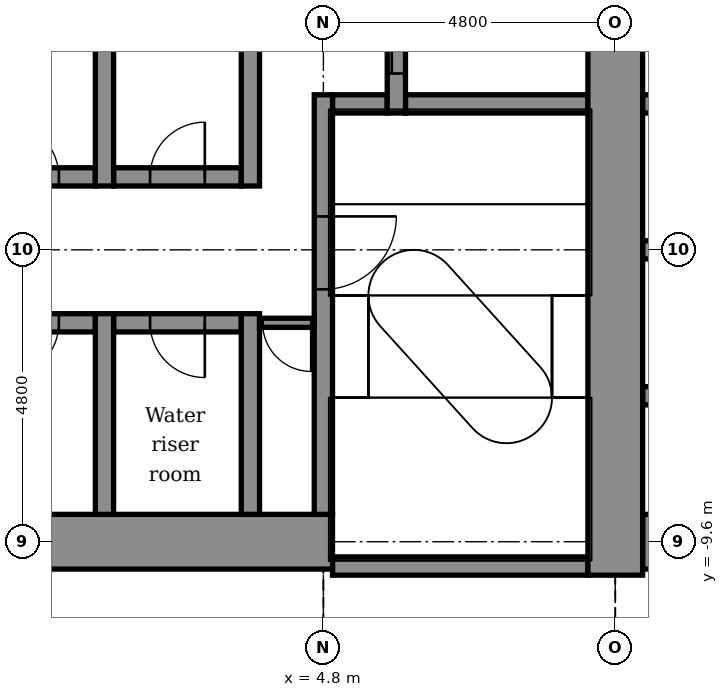
"""IFC4 building model, lengths in metres.
Left out: names, types, materials, properties, quantities, classifications, styles, units other than length and angle.
Written with IfcOpenShell. Run it as: python <this file> out.ifc"""

import sys

from ifc_helpers import new_model, si_unit, direction, frame, frame_2d, origin, place, context, subcontext, project, spatial, rectangle, extrude, element, fill, save


model = new_model("IFC4")
c1 = context("Model", 3, precision=1e-05, world=origin(), true_north=direction((0.0, 1.0)))
c2 = subcontext(c1, "Body", "Model", "MODEL_VIEW")
j1 = project(units=[si_unit("LENGTHUNIT", "METRE"), si_unit("PLANEANGLEUNIT", "RADIAN")], contexts=[c1])
p1 = place(None, origin())
s1 = spatial("IfcSite", under=j1, at=p1, CompositionType="ELEMENT")
p2 = place(p1, origin())
s2 = spatial("IfcBuilding", under=s1, at=p2, CompositionType="ELEMENT")
p3 = place(p2, frame((0.0, 0.0, 113.9)))
s3 = spatial("IfcBuildingStorey", under=s2, at=p3, CompositionType="ELEMENT", Elevation=113.9)
p4 = place(p3, frame((4.95, -10.0, -0.2), z_axis=(0.0, 0.0, 1.0), x_axis=(1.0, 0.0, 0.0)))
e1 = element("IfcWall", 1, at=p4, inside=s3, PredefinedType="STANDARD", context=c2, shape_type="SweptSolid", body=[
    extrude(rectangle(XDim=4.2, YDim=0.3, at=frame_2d((2.1, 0.0))), origin(), (0.0, 0.0, 1.0), 4.5),
])
p5 = place(p3, frame((-5.25, -9.6, -0.2), z_axis=(0.0, 0.0, 1.0), x_axis=(1.0, 0.0, 0.0)))
e2 = element("IfcWall", 2, at=p5, inside=s3, PredefinedType="SHEAR", context=c2, shape_type="SweptSolid", body=[
    extrude(rectangle(XDim=10.2, YDim=0.9, at=frame_2d((5.1, 0.0))), origin(), (0.0, 0.0, 1.0), 4.5),
])
p6 = place(p5, frame((0.6, 0.0, 0.2)))
e3 = element("IfcOpeningElement", 3, at=p6, cuts=e2, PredefinedType="OPENING", context=c2, shape_type="SweptSolid", body=[
    extrude(rectangle(XDim=0.9, YDim=2.1, at=frame_2d((0.45, 1.05))), frame((0.0, 0.46, 0.0), z_axis=(0.0, -1.0, 0.0), x_axis=(1.0, 0.0, 0.0)), (0.0, 0.0, 1.0), 0.92),
])
p7 = place(p3, frame((10.05, -9.6, -0.2), z_axis=(0.0, 0.0, 1.0), x_axis=(1.0, 0.0, 0.0)))
e4 = element("IfcWall", 4, at=p7, inside=s3, PredefinedType="SHEAR", context=c2, shape_type="SweptSolid", body=[
    extrude(rectangle(XDim=3.9, YDim=0.9, at=frame_2d((1.95, 0.0))), origin(), (0.0, 0.0, 1.0), 4.5),
])
p8 = place(p7, frame((0.5, 0.0, 0.2)))
e5 = element("IfcOpeningElement", 5, at=p8, cuts=e4, PredefinedType="OPENING", context=c2, shape_type="SweptSolid", body=[
    extrude(rectangle(XDim=0.9, YDim=2.1, at=frame_2d((0.45, 1.05))), frame((0.0, 0.46, 0.0), z_axis=(0.0, -1.0, 0.0), x_axis=(1.0, 0.0, 0.0)), (0.0, 0.0, 1.0), 0.92),
])
p9 = place(p7, frame((2.9, 0.0, 0.2)))
e6 = element("IfcOpeningElement", 6, at=p9, cuts=e4, PredefinedType="OPENING", context=c2, shape_type="SweptSolid", body=[
    extrude(rectangle(XDim=0.9, YDim=2.1, at=frame_2d((0.45, 1.05))), frame((0.0, 0.46, 0.0), z_axis=(0.0, -1.0, 0.0), x_axis=(1.0, 0.0, 0.0)), (0.0, 0.0, 1.0), 0.92),
])
p10 = place(p3, frame((10.05, -7.2, -0.2), z_axis=(0.0, 0.0, 1.0), x_axis=(1.0, 0.0, 0.0)))
e7 = element("IfcWall", 7, at=p10, inside=s3, PredefinedType="STANDARD", context=c2, shape_type="SweptSolid", body=[
    extrude(rectangle(XDim=3.9, YDim=0.3, at=frame_2d((1.95, 0.0))), origin(), (0.0, 0.0, 1.0), 4.5),
])
p11 = place(p3, frame((-1.05, -6.0, -0.2), z_axis=(0.0, 0.0, 1.0), x_axis=(1.0, 0.0, 0.0)))
e8 = element("IfcWall", 8, at=p11, inside=s3, PredefinedType="STANDARD", context=c2, shape_type="SweptSolid", body=[
    extrude(rectangle(XDim=2.1, YDim=0.3, at=frame_2d((1.05, 0.0))), origin(), (0.0, 0.0, 1.0), 4.5),
])
p12 = place(p11, frame((0.6, 0.0, 0.2)))
e9 = element("IfcOpeningElement", 9, at=p12, cuts=e8, PredefinedType="OPENING", context=c2, shape_type="SweptSolid", body=[
    extrude(rectangle(XDim=0.9, YDim=2.1, at=frame_2d((0.45, 1.05))), frame((0.0, 0.16, 0.0), z_axis=(0.0, -1.0, 0.0), x_axis=(1.0, 0.0, 0.0)), (0.0, 0.0, 1.0), 0.32),
])
p13 = place(p3, frame((1.35, -6.0, -0.2), z_axis=(0.0, 0.0, 1.0), x_axis=(1.0, 0.0, 0.0)))
e10 = element("IfcWall", 10, at=p13, inside=s3, PredefinedType="STANDARD", context=c2, shape_type="SweptSolid", body=[
    extrude(rectangle(XDim=2.1, YDim=0.3, at=frame_2d((1.05, 0.0))), origin(), (0.0, 0.0, 1.0), 4.5),
])
p14 = place(p13, frame((0.6, 0.0, 0.2)))
e11 = element("IfcOpeningElement", 11, at=p14, cuts=e10, PredefinedType="OPENING", context=c2, shape_type="SweptSolid", body=[
    extrude(rectangle(XDim=0.9, YDim=2.1, at=frame_2d((0.45, 1.05))), frame((0.0, 0.16, 0.0), z_axis=(0.0, -1.0, 0.0), x_axis=(1.0, 0.0, 0.0)), (0.0, 0.0, 1.0), 0.32),
])
p15 = place(p3, frame((10.05, -4.8, -0.2), z_axis=(0.0, 0.0, 1.0), x_axis=(1.0, 0.0, 0.0)))
e12 = element("IfcWall", 12, at=p15, inside=s3, PredefinedType="STANDARD", context=c2, shape_type="SweptSolid", body=[
    extrude(rectangle(XDim=3.9, YDim=0.3, at=frame_2d((1.95, 0.0))), origin(), (0.0, 0.0, 1.0), 4.5),
])
p16 = place(p3, frame((-1.05, -3.6, -0.2), z_axis=(0.0, 0.0, 1.0), x_axis=(1.0, 0.0, 0.0)))
e13 = element("IfcWall", 13, at=p16, inside=s3, PredefinedType="STANDARD", context=c2, shape_type="SweptSolid", body=[
    extrude(rectangle(XDim=2.1, YDim=0.3, at=frame_2d((1.05, 0.0))), origin(), (0.0, 0.0, 1.0), 4.5),
])
p17 = place(p16, frame((0.6, 0.0, 0.2)))
e14 = element("IfcOpeningElement", 14, at=p17, cuts=e13, PredefinedType="OPENING", context=c2, shape_type="SweptSolid", body=[
    extrude(rectangle(XDim=0.9, YDim=2.1, at=frame_2d((0.45, 1.05))), frame((0.0, 0.16, 0.0), z_axis=(0.0, -1.0, 0.0), x_axis=(1.0, 0.0, 0.0)), (0.0, 0.0, 1.0), 0.32),
])
p18 = place(p3, frame((1.35, -3.6, -0.2), z_axis=(0.0, 0.0, 1.0), x_axis=(1.0, 0.0, 0.0)))
e15 = element("IfcWall", 15, at=p18, inside=s3, PredefinedType="STANDARD", context=c2, shape_type="SweptSolid", body=[
    extrude(rectangle(XDim=2.1, YDim=0.3, at=frame_2d((1.05, 0.0))), origin(), (0.0, 0.0, 1.0), 4.5),
])
p19 = place(p18, frame((0.6, 0.0, 0.2)))
e16 = element("IfcOpeningElement", 16, at=p19, cuts=e15, PredefinedType="OPENING", context=c2, shape_type="SweptSolid", body=[
    extrude(rectangle(XDim=0.9, YDim=2.1, at=frame_2d((0.45, 1.05))), frame((0.0, 0.16, 0.0), z_axis=(0.0, -1.0, 0.0), x_axis=(1.0, 0.0, 0.0)), (0.0, 0.0, 1.0), 0.32),
])
p20 = place(p3, frame((4.95, -2.4, -0.2), z_axis=(0.0, 0.0, 1.0), x_axis=(1.0, 0.0, 0.0)))
e17 = element("IfcWall", 17, at=p20, inside=s3, PredefinedType="STANDARD", context=c2, shape_type="SweptSolid", body=[
    extrude(rectangle(XDim=0.9, YDim=0.3, at=frame_2d((0.45, 0.0))), origin(), (0.0, 0.0, 1.0), 4.5),
])
p21 = place(p3, frame((6.15, -2.4, -0.2), z_axis=(0.0, 0.0, 1.0), x_axis=(1.0, 0.0, 0.0)))
e18 = element("IfcWall", 18, at=p21, inside=s3, PredefinedType="STANDARD", context=c2, shape_type="SweptSolid", body=[
    extrude(rectangle(XDim=3.0, YDim=0.3, at=frame_2d((1.5, 0.0))), origin(), (0.0, 0.0, 1.0), 4.5),
])
p22 = place(p3, frame((10.05, -2.4, -0.2), z_axis=(0.0, 0.0, 1.0), x_axis=(1.0, 0.0, 0.0)))
e19 = element("IfcWall", 19, at=p22, inside=s3, PredefinedType="STANDARD", context=c2, shape_type="SweptSolid", body=[
    extrude(rectangle(XDim=3.9, YDim=0.3, at=frame_2d((1.95, 0.0))), origin(), (0.0, 0.0, 1.0), 4.5),
])
p23 = place(p3, frame((1.2, -9.15, -0.2), z_axis=(0.0, 0.0, 1.0), x_axis=(0.0, 1.0, 0.0)))
e20 = element("IfcWall", 20, at=p23, inside=s3, PredefinedType="STANDARD", context=c2, shape_type="SweptSolid", body=[
    extrude(rectangle(XDim=3.3, YDim=0.3, at=frame_2d((1.65, 0.0))), origin(), (0.0, 0.0, 1.0), 4.5),
])
p24 = place(p3, frame((1.2, -3.75, -0.2), z_axis=(0.0, 0.0, 1.0), x_axis=(0.0, 1.0, 0.0)))
e21 = element("IfcWall", 21, at=p24, inside=s3, PredefinedType="STANDARD", context=c2, shape_type="SweptSolid", body=[
    extrude(rectangle(XDim=7.5, YDim=0.3, at=frame_2d((3.75, 0.0))), origin(), (0.0, 0.0, 1.0), 4.5),
])
p25 = place(p3, frame((3.6, -9.15, -0.2), z_axis=(0.0, 0.0, 1.0), x_axis=(0.0, 1.0, 0.0)))
e22 = element("IfcWall", 22, at=p25, inside=s3, PredefinedType="STANDARD", context=c2, shape_type="SweptSolid", body=[
    extrude(rectangle(XDim=3.3, YDim=0.3, at=frame_2d((1.65, 0.0))), origin(), (0.0, 0.0, 1.0), 4.5),
])
p26 = place(p3, frame((3.6, -3.75, -0.2), z_axis=(0.0, 0.0, 1.0), x_axis=(0.0, 1.0, 0.0)))
e23 = element("IfcWall", 23, at=p26, inside=s3, PredefinedType="STANDARD", context=c2, shape_type="SweptSolid", body=[
    extrude(rectangle(XDim=7.5, YDim=0.3, at=frame_2d((3.75, 0.0))), origin(), (0.0, 0.0, 1.0), 4.5),
])
p27 = place(p3, frame((4.8, -9.15, -0.2), z_axis=(0.0, 0.0, 1.0), x_axis=(0.0, 1.0, 0.0)))
e24 = element("IfcWall", 24, at=p27, inside=s3, PredefinedType="STANDARD", context=c2, shape_type="SweptSolid", body=[
    extrude(rectangle(XDim=6.9, YDim=0.3, at=frame_2d((3.45, 0.0))), origin(), (0.0, 0.0, 1.0), 4.5),
])
p28 = place(p27, frame((3.7, 0.0, 0.2)))
e25 = element("IfcOpeningElement", 25, at=p28, cuts=e24, PredefinedType="OPENING", context=c2, shape_type="SweptSolid", body=[
    extrude(rectangle(XDim=1.2, YDim=2.1, at=frame_2d((0.6, 1.05))), frame((0.0, 0.16, 0.0), z_axis=(0.0, -1.0, 0.0), x_axis=(1.0, 0.0, 0.0)), (0.0, 0.0, 1.0), 0.32),
])
p29 = place(p3, frame((6.0, -2.55, -0.2), z_axis=(0.0, 0.0, 1.0), x_axis=(0.0, 1.0, 0.0)))
e26 = element("IfcWall", 26, at=p29, inside=s3, PredefinedType="STANDARD", context=c2, shape_type="SweptSolid", body=[
    extrude(rectangle(XDim=7.5, YDim=0.3, at=frame_2d((3.75, 0.0))), origin(), (0.0, 0.0, 1.0), 4.5),
])
p30 = place(p29, frame((0.65, 0.0, 0.2)))
e27 = element("IfcOpeningElement", 27, at=p30, cuts=e26, PredefinedType="OPENING", context=c2, shape_type="SweptSolid", body=[
    extrude(rectangle(XDim=1.4, YDim=2.1, at=frame_2d((0.7, 1.05))), frame((0.0, 0.16, 0.0), z_axis=(0.0, -1.0, 0.0), x_axis=(1.0, 0.0, 0.0)), (0.0, 0.0, 1.0), 0.32),
])
p31 = place(p29, frame((3.05, 0.0, 0.2)))
e28 = element("IfcOpeningElement", 28, at=p31, cuts=e26, PredefinedType="OPENING", context=c2, shape_type="SweptSolid", body=[
    extrude(rectangle(XDim=1.4, YDim=2.1, at=frame_2d((0.7, 1.05))), frame((0.0, 0.16, 0.0), z_axis=(0.0, -1.0, 0.0), x_axis=(1.0, 0.0, 0.0)), (0.0, 0.0, 1.0), 0.32),
])
p32 = place(p29, frame((5.45, 0.0, 0.2)))
e29 = element("IfcOpeningElement", 29, at=p32, cuts=e26, PredefinedType="OPENING", context=c2, shape_type="SweptSolid", body=[
    extrude(rectangle(XDim=1.4, YDim=2.1, at=frame_2d((0.7, 1.05))), frame((0.0, 0.16, 0.0), z_axis=(0.0, -1.0, 0.0), x_axis=(1.0, 0.0, 0.0)), (0.0, 0.0, 1.0), 0.32),
])
p33 = place(p3, frame((9.6, -10.15, -0.2), z_axis=(0.0, 0.0, 1.0), x_axis=(0.0, 1.0, 0.0)))
e30 = element("IfcWall", 30, at=p33, inside=s3, PredefinedType="SHEAR", context=c2, shape_type="SweptSolid", body=[
    extrude(rectangle(XDim=20.2, YDim=0.9, at=frame_2d((10.1, 0.0))), origin(), (0.0, 0.0, 1.0), 4.5),
])
p34 = place(p3, frame((3.75, -6.0, 0.0), z_axis=(0.0, 0.0, 1.0), x_axis=(1.0, 0.0, 0.0)))
e31 = element("IfcWall", 31, at=p34, inside=s3, PredefinedType="PARTITIONING", context=c2, shape_type="SweptSolid", body=[
    extrude(rectangle(XDim=0.9, YDim=0.15, at=frame_2d((0.45, 0.0))), origin(), (0.0, 0.0, 1.0), 4.3),
])
p35 = place(p34, frame((0.05, 0.0, 0.0)))
e32 = element("IfcOpeningElement", 32, at=p35, cuts=e31, PredefinedType="OPENING", context=c2, shape_type="SweptSolid", body=[
    extrude(rectangle(XDim=0.8, YDim=2.1, at=frame_2d((0.4, 1.05))), frame((0.0, 0.085, 0.0), z_axis=(0.0, -1.0, 0.0), x_axis=(1.0, 0.0, 0.0)), (0.0, 0.0, 1.0), 0.17),
])
p36 = place(p35, frame((0.8, 0.0, 0.0), z_axis=(0.0, 0.0, 1.0), x_axis=(-1.0, 0.0, 0.0)))
e33 = element("IfcDoor", 33, at=p36, inside=s3, OperationType="SINGLE_SWING_RIGHT", PredefinedType="DOOR", context=c2, shape_type="SweptSolid", body=[
    extrude(rectangle(XDim=0.8, YDim=2.1, at=frame_2d((0.4, 1.05))), frame((0.0, 0.025, 0.0), z_axis=(0.0, -1.0, 0.0), x_axis=(1.0, 0.0, 0.0)), (0.0, 0.0, 1.0), 0.05),
])
fill(e32, e33)
p37 = place(p30, origin())
e34 = element("IfcDoor", 34, at=p37, inside=s3, OperationType="DOUBLE_DOOR_SLIDING", PredefinedType="DOOR", context=c2, shape_type="SweptSolid", body=[
    extrude(rectangle(XDim=1.4, YDim=2.1, at=frame_2d((0.7, 1.05))), frame((0.0, 0.025, 0.0), z_axis=(0.0, -1.0, 0.0), x_axis=(1.0, 0.0, 0.0)), (0.0, 0.0, 1.0), 0.05),
])
fill(e27, e34)
p38 = place(p28, frame((1.2, 0.0, 0.0), z_axis=(0.0, 0.0, 1.0), x_axis=(-1.0, 0.0, 0.0)))
e35 = element("IfcDoor", 35, at=p38, inside=s3, OperationType="SINGLE_SWING_RIGHT", PredefinedType="DOOR", context=c2, shape_type="SweptSolid", body=[
    extrude(rectangle(XDim=1.2, YDim=2.1, at=frame_2d((0.6, 1.05))), frame((0.0, 0.025, 0.0), z_axis=(0.0, -1.0, 0.0), x_axis=(1.0, 0.0, 0.0)), (0.0, 0.0, 1.0), 0.05),
])
fill(e25, e35)
p39 = place(p17, origin())
e36 = element("IfcDoor", 36, at=p39, inside=s3, OperationType="SINGLE_SWING_LEFT", PredefinedType="DOOR", context=c2, shape_type="SweptSolid", body=[
    extrude(rectangle(XDim=0.9, YDim=2.1, at=frame_2d((0.45, 1.05))), frame((0.0, 0.025, 0.0), z_axis=(0.0, -1.0, 0.0), x_axis=(1.0, 0.0, 0.0)), (0.0, 0.0, 1.0), 0.05),
])
fill(e14, e36)
p40 = place(p19, origin())
e37 = element("IfcDoor", 37, at=p40, inside=s3, OperationType="SINGLE_SWING_RIGHT", PredefinedType="DOOR", context=c2, shape_type="SweptSolid", body=[
    extrude(rectangle(XDim=0.9, YDim=2.1, at=frame_2d((0.45, 1.05))), frame((0.0, 0.025, 0.0), z_axis=(0.0, -1.0, 0.0), x_axis=(1.0, 0.0, 0.0)), (0.0, 0.0, 1.0), 0.05),
])
fill(e16, e37)
p41 = place(p12, frame((0.9, 0.0, 0.0), z_axis=(0.0, 0.0, 1.0), x_axis=(-1.0, 0.0, 0.0)))
e38 = element("IfcDoor", 38, at=p41, inside=s3, OperationType="SINGLE_SWING_LEFT", PredefinedType="DOOR", context=c2, shape_type="SweptSolid", body=[
    extrude(rectangle(XDim=0.9, YDim=2.1, at=frame_2d((0.45, 1.05))), frame((0.0, 0.025, 0.0), z_axis=(0.0, -1.0, 0.0), x_axis=(1.0, 0.0, 0.0)), (0.0, 0.0, 1.0), 0.05),
])
fill(e9, e38)
p42 = place(p14, frame((0.9, 0.0, 0.0), z_axis=(0.0, 0.0, 1.0), x_axis=(-1.0, 0.0, 0.0)))
e39 = element("IfcDoor", 39, at=p42, inside=s3, OperationType="SINGLE_SWING_RIGHT", PredefinedType="DOOR", context=c2, shape_type="SweptSolid", body=[
    extrude(rectangle(XDim=0.9, YDim=2.1, at=frame_2d((0.45, 1.05))), frame((0.0, 0.025, 0.0), z_axis=(0.0, -1.0, 0.0), x_axis=(1.0, 0.0, 0.0)), (0.0, 0.0, 1.0), 0.05),
])
fill(e11, e39)
save(model, sys.argv[1])
